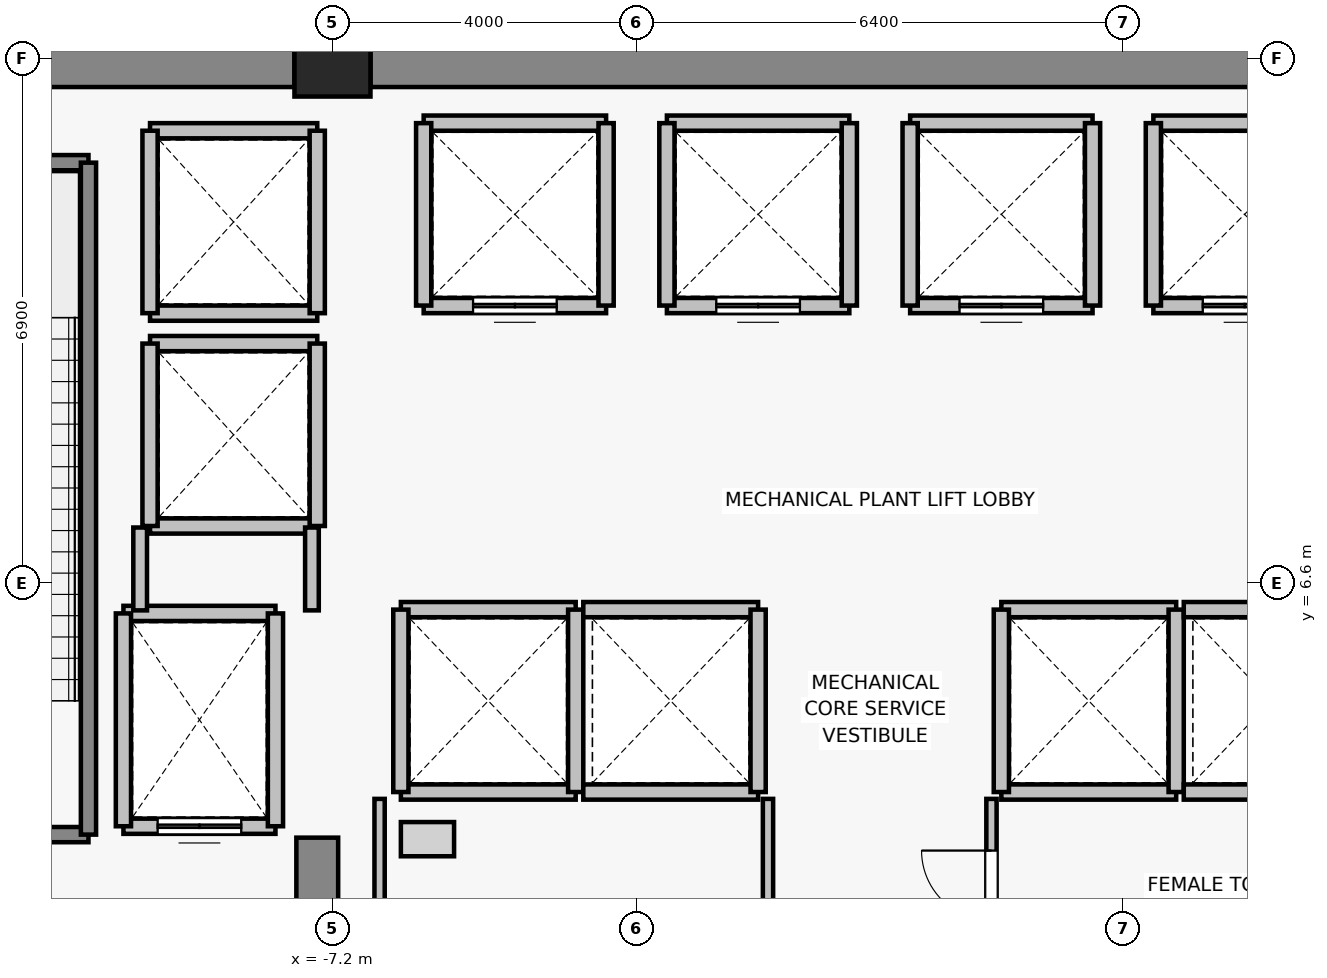
"""IFC4 building model, lengths in metres.
Left out: names, types, materials, properties, quantities, classifications, styles, units other than length and angle.
Written with IfcOpenShell. Run it as: python <this file> out.ifc"""

import sys

from ifc_helpers import new_model, si_unit, direction, frame, frame_2d, origin, origin_2d, place, context, subcontext, project, spatial, rectangle, extrude, source, transform, mapped, element, fill, save


model = new_model("IFC4")
c1 = context("Model", 3, precision=1e-05, world=origin(), true_north=direction((0.0, 1.0)))
c2 = subcontext(c1, "Body", "Model", "MODEL_VIEW")
j1 = project(units=[si_unit("LENGTHUNIT", "METRE"), si_unit("PLANEANGLEUNIT", "RADIAN")], contexts=[c1])
p1 = place(None, origin())
s1 = spatial("IfcSite", under=j1, at=p1, CompositionType="ELEMENT")
p2 = place(p1, origin())
s2 = spatial("IfcBuilding", under=s1, at=p2, CompositionType="ELEMENT")
p3 = place(p2, frame((0.0, 0.0, 80.2)))
s3 = spatial("IfcBuildingStorey", under=s2, at=p3, CompositionType="ELEMENT", Elevation=80.2)
p4 = place(p3, frame((-7.2, 13.5, 0.0), z_axis=(0.0, 0.0, 1.0), x_axis=(1.0, 0.0, 0.0)))
e1 = element("IfcColumn", 1, at=p4, inside=s3, PredefinedType="COLUMN", context=c2, shape_type="SweptSolid", body=[
    extrude(rectangle(XDim=1.0, YDim=1.0, at=origin_2d()), origin(), (0.0, 0.0, 1.0), 6.6),
])
p5 = place(p3, frame((-13.9, 13.5, 0.0), z_axis=(0.0, 0.0, 1.0), x_axis=(1.0, 0.0, 0.0)))
e2 = element("IfcWall", 2, at=p5, inside=s3, PredefinedType="SHEAR", context=c2, shape_type="SweptSolid", body=[
    extrude(rectangle(XDim=6.2, YDim=0.75, at=frame_2d((3.1, 0.0))), origin(), (0.0, 0.0, 1.0), 6.35),
])
p6 = place(p3, frame((-6.7, 13.5, 0.0), z_axis=(0.0, 0.0, 1.0), x_axis=(1.0, 0.0, 0.0)))
e3 = element("IfcWall", 3, at=p6, inside=s3, PredefinedType="SHEAR", context=c2, shape_type="SweptSolid", body=[
    extrude(rectangle(XDim=13.4, YDim=0.75, at=frame_2d((6.7, 0.0))), origin(), (0.0, 0.0, 1.0), 6.35),
])
p7 = place(p3, frame((-7.4, -0.825, 0.0), z_axis=(0.0, 0.0, 1.0), x_axis=(0.0, 1.0, 0.0)))
e4 = element("IfcWall", 4, at=p7, inside=s3, PredefinedType="SHEAR", context=c2, shape_type="SweptSolid", body=[
    extrude(rectangle(XDim=4.075, YDim=0.55, at=frame_2d((2.038, 0.0))), origin(), (0.0, 0.0, 1.0), 6.35),
])
p8 = place(p3, frame((-7.95, 3.4, 0.0), z_axis=(0.0, 0.0, 1.0), x_axis=(-1.0, 0.0, 0.0)))
e5 = element("IfcWall", 5, at=p8, inside=s3, PredefinedType="SOLIDWALL", context=c2, shape_type="SweptSolid", body=[
    extrude(rectangle(XDim=2.0, YDim=0.2, at=frame_2d((1.0, 0.0))), origin(), (0.0, 0.0, 1.0), 6.35),
])
p9 = place(p8, frame((0.45, 0.0, 0.0)))
e6 = element("IfcOpeningElement", 6, at=p9, cuts=e5, PredefinedType="OPENING", context=c2, shape_type="SweptSolid", body=[
    extrude(rectangle(XDim=1.1, YDim=2.2, at=frame_2d((0.55, 1.1))), frame((0.0, 0.11, 0.0), z_axis=(0.0, -1.0, 0.0), x_axis=(1.0, 0.0, 0.0)), (0.0, 0.0, 1.0), 0.22),
])
p10 = place(p3, frame((-9.95, 6.2, 0.0), z_axis=(0.0, 0.0, 1.0), x_axis=(1.0, 0.0, 0.0)))
e7 = element("IfcWall", 7, at=p10, inside=s3, PredefinedType="SOLIDWALL", context=c2, shape_type="SweptSolid", body=[
    extrude(rectangle(XDim=2.0, YDim=0.2, at=frame_2d((1.0, 0.0))), origin(), (0.0, 0.0, 1.0), 6.35),
])
for number, where, z_axis, x_axis in (
    (8, (-9.95, 3.4, 0.0), (0.0, 0.0, 1.0), (0.0, 1.0, 0.0)),
    (9, (-7.95, 6.2, 0.0), (0.0, 0.0, 1.0), (0.0, -1.0, 0.0)),
):
    element("IfcWall", number, at=place(p3, frame(where, z_axis=z_axis, x_axis=x_axis)), inside=s3, PredefinedType="SOLIDWALL", context=c2, shape_type="SweptSolid", body=[
        extrude(rectangle(XDim=2.8, YDim=0.2, at=frame_2d((1.4, 0.0))), origin(), (0.0, 0.0, 1.0), 6.35),
    ])
p11 = place(p3, frame((-3.6, 10.25, 0.0), z_axis=(0.0, 0.0, 1.0), x_axis=(-1.0, 0.0, 0.0)))
e10 = element("IfcWall", 10, at=p11, inside=s3, PredefinedType="SOLIDWALL", context=c2, shape_type="SweptSolid", body=[
    extrude(rectangle(XDim=2.4, YDim=0.2, at=frame_2d((1.2, 0.0))), origin(), (0.0, 0.0, 1.0), 5.89),
])
p12 = place(p11, frame((0.65, 0.0, 0.0)))
e11 = element("IfcOpeningElement", 11, at=p12, cuts=e10, PredefinedType="OPENING", context=c2, shape_type="SweptSolid", body=[
    extrude(rectangle(XDim=1.1, YDim=2.2, at=frame_2d((0.55, 1.1))), frame((0.0, 0.11, 0.0), z_axis=(0.0, -1.0, 0.0), x_axis=(1.0, 0.0, 0.0)), (0.0, 0.0, 1.0), 0.22),
])
p13 = place(p3, frame((-6.0, 12.65, 0.0), z_axis=(0.0, 0.0, 1.0), x_axis=(1.0, 0.0, 0.0)))
e12 = element("IfcWall", 12, at=p13, inside=s3, PredefinedType="SOLIDWALL", context=c2, shape_type="SweptSolid", body=[
    extrude(rectangle(XDim=2.4, YDim=0.2, at=frame_2d((1.2, 0.0))), origin(), (0.0, 0.0, 1.0), 5.89),
])
for number, where, z_axis, x_axis in (
    (13, (-6.0, 10.25, 0.0), (0.0, 0.0, 1.0), (0.0, 1.0, 0.0)),
    (14, (-3.6, 12.65, 0.0), (0.0, 0.0, 1.0), (0.0, -1.0, 0.0)),
):
    element("IfcWall", number, at=place(p3, frame(where, z_axis=z_axis, x_axis=x_axis)), inside=s3, PredefinedType="SOLIDWALL", context=c2, shape_type="SweptSolid", body=[
        extrude(rectangle(XDim=2.4, YDim=0.2, at=frame_2d((1.2, 0.0))), origin(), (0.0, 0.0, 1.0), 6.35),
    ])
p14 = place(p3, frame((-0.4, 10.25, 0.0), z_axis=(0.0, 0.0, 1.0), x_axis=(-1.0, 0.0, 0.0)))
e15 = element("IfcWall", 15, at=p14, inside=s3, PredefinedType="SOLIDWALL", context=c2, shape_type="SweptSolid", body=[
    extrude(rectangle(XDim=2.4, YDim=0.2, at=frame_2d((1.2, 0.0))), origin(), (0.0, 0.0, 1.0), 6.35),
])
p15 = place(p14, frame((0.65, 0.0, 0.0)))
e16 = element("IfcOpeningElement", 16, at=p15, cuts=e15, PredefinedType="OPENING", context=c2, shape_type="SweptSolid", body=[
    extrude(rectangle(XDim=1.1, YDim=2.2, at=frame_2d((0.55, 1.1))), frame((0.0, 0.11, 0.0), z_axis=(0.0, -1.0, 0.0), x_axis=(1.0, 0.0, 0.0)), (0.0, 0.0, 1.0), 0.22),
])
p16 = place(p3, frame((-2.8, 12.65, 0.0), z_axis=(0.0, 0.0, 1.0), x_axis=(1.0, 0.0, 0.0)))
e17 = element("IfcWall", 17, at=p16, inside=s3, PredefinedType="SOLIDWALL", context=c2, shape_type="SweptSolid", body=[
    extrude(rectangle(XDim=2.4, YDim=0.2, at=frame_2d((1.2, 0.0))), origin(), (0.0, 0.0, 1.0), 6.35),
])
for number, where, z_axis, x_axis in (
    (18, (-2.8, 10.25, 0.0), (0.0, 0.0, 1.0), (0.0, 1.0, 0.0)),
    (19, (-0.4, 12.65, 0.0), (0.0, 0.0, 1.0), (0.0, -1.0, 0.0)),
):
    element("IfcWall", number, at=place(p3, frame(where, z_axis=z_axis, x_axis=x_axis)), inside=s3, PredefinedType="SOLIDWALL", context=c2, shape_type="SweptSolid", body=[
        extrude(rectangle(XDim=2.4, YDim=0.2, at=frame_2d((1.2, 0.0))), origin(), (0.0, 0.0, 1.0), 6.35),
    ])
p17 = place(p3, frame((2.8, 10.25, 0.0), z_axis=(0.0, 0.0, 1.0), x_axis=(-1.0, 0.0, 0.0)))
e20 = element("IfcWall", 20, at=p17, inside=s3, PredefinedType="SOLIDWALL", context=c2, shape_type="SweptSolid", body=[
    extrude(rectangle(XDim=2.4, YDim=0.2, at=frame_2d((1.2, 0.0))), origin(), (0.0, 0.0, 1.0), 6.35),
])
p18 = place(p17, frame((0.65, 0.0, 0.0)))
e21 = element("IfcOpeningElement", 21, at=p18, cuts=e20, PredefinedType="OPENING", context=c2, shape_type="SweptSolid", body=[
    extrude(rectangle(XDim=1.1, YDim=2.2, at=frame_2d((0.55, 1.1))), frame((0.0, 0.11, 0.0), z_axis=(0.0, -1.0, 0.0), x_axis=(1.0, 0.0, 0.0)), (0.0, 0.0, 1.0), 0.22),
])
p19 = place(p3, frame((0.4, 12.65, 0.0), z_axis=(0.0, 0.0, 1.0), x_axis=(1.0, 0.0, 0.0)))
e22 = element("IfcWall", 22, at=p19, inside=s3, PredefinedType="SOLIDWALL", context=c2, shape_type="SweptSolid", body=[
    extrude(rectangle(XDim=2.4, YDim=0.2, at=frame_2d((1.2, 0.0))), origin(), (0.0, 0.0, 1.0), 6.35),
])
for number, where, z_axis, x_axis in (
    (23, (0.4, 10.25, 0.0), (0.0, 0.0, 1.0), (0.0, 1.0, 0.0)),
    (24, (2.8, 12.65, 0.0), (0.0, 0.0, 1.0), (0.0, -1.0, 0.0)),
):
    element("IfcWall", number, at=place(p3, frame(where, z_axis=z_axis, x_axis=x_axis)), inside=s3, PredefinedType="SOLIDWALL", context=c2, shape_type="SweptSolid", body=[
        extrude(rectangle(XDim=2.4, YDim=0.2, at=frame_2d((1.2, 0.0))), origin(), (0.0, 0.0, 1.0), 6.35),
    ])
p20 = place(p3, frame((6.0, 10.25, 0.0), z_axis=(0.0, 0.0, 1.0), x_axis=(-1.0, 0.0, 0.0)))
e25 = element("IfcWall", 25, at=p20, inside=s3, PredefinedType="SOLIDWALL", context=c2, shape_type="SweptSolid", body=[
    extrude(rectangle(XDim=2.4, YDim=0.2, at=frame_2d((1.2, 0.0))), origin(), (0.0, 0.0, 1.0), 5.89),
])
p21 = place(p20, frame((0.65, 0.0, 0.0)))
e26 = element("IfcOpeningElement", 26, at=p21, cuts=e25, PredefinedType="OPENING", context=c2, shape_type="SweptSolid", body=[
    extrude(rectangle(XDim=1.1, YDim=2.2, at=frame_2d((0.55, 1.1))), frame((0.0, 0.11, 0.0), z_axis=(0.0, -1.0, 0.0), x_axis=(1.0, 0.0, 0.0)), (0.0, 0.0, 1.0), 0.22),
])
p22 = place(p3, frame((3.6, 12.65, 0.0), z_axis=(0.0, 0.0, 1.0), x_axis=(1.0, 0.0, 0.0)))
e27 = element("IfcWall", 27, at=p22, inside=s3, PredefinedType="SOLIDWALL", context=c2, shape_type="SweptSolid", body=[
    extrude(rectangle(XDim=2.4, YDim=0.2, at=frame_2d((1.2, 0.0))), origin(), (0.0, 0.0, 1.0), 5.89),
])
p23 = place(p3, frame((3.6, 10.25, 0.0), z_axis=(0.0, 0.0, 1.0), x_axis=(0.0, 1.0, 0.0)))
e28 = element("IfcWall", 28, at=p23, inside=s3, PredefinedType="SOLIDWALL", context=c2, shape_type="SweptSolid", body=[
    extrude(rectangle(XDim=2.4, YDim=0.2, at=frame_2d((1.2, 0.0))), origin(), (0.0, 0.0, 1.0), 6.35),
])
for number, where, z_axis, x_axis in (
    (29, (-4.0, 3.85, 0.0), (0.0, 0.0, 1.0), (-1.0, 0.0, 0.0)),
    (30, (-6.3, 6.25, 0.0), (0.0, 0.0, 1.0), (1.0, 0.0, 0.0)),
):
    element("IfcWall", number, at=place(p3, frame(where, z_axis=z_axis, x_axis=x_axis)), inside=s3, PredefinedType="SOLIDWALL", context=c2, shape_type="SweptSolid", body=[
        extrude(rectangle(XDim=2.3, YDim=0.2, at=frame_2d((1.15, 0.0))), origin(), (0.0, 0.0, 1.0), 6.35),
    ])
for number, where, z_axis, x_axis in (
    (31, (-6.3, 3.85, 0.0), (0.0, 0.0, 1.0), (0.0, 1.0, 0.0)),
    (32, (-4.0, 6.25, 0.0), (0.0, 0.0, 1.0), (0.0, -1.0, 0.0)),
):
    element("IfcWall", number, at=place(p3, frame(where, z_axis=z_axis, x_axis=x_axis)), inside=s3, PredefinedType="SOLIDWALL", context=c2, shape_type="SweptSolid", body=[
        extrude(rectangle(XDim=2.4, YDim=0.2, at=frame_2d((1.2, 0.0))), origin(), (0.0, 0.0, 1.0), 6.35),
    ])
for number, where, z_axis, x_axis in (
    (33, (-1.6, 3.85, 0.0), (0.0, 0.0, 1.0), (-1.0, 0.0, 0.0)),
    (34, (-3.9, 6.25, 0.0), (0.0, 0.0, 1.0), (1.0, 0.0, 0.0)),
):
    element("IfcWall", number, at=place(p3, frame(where, z_axis=z_axis, x_axis=x_axis)), inside=s3, PredefinedType="SOLIDWALL", context=c2, shape_type="SweptSolid", body=[
        extrude(rectangle(XDim=2.3, YDim=0.2, at=frame_2d((1.15, 0.0))), origin(), (0.0, 0.0, 1.0), 6.35),
    ])
p24 = place(p3, frame((-1.6, 6.25, 0.0), z_axis=(0.0, 0.0, 1.0), x_axis=(0.0, -1.0, 0.0)))
e35 = element("IfcWall", 35, at=p24, inside=s3, PredefinedType="SOLIDWALL", context=c2, shape_type="SweptSolid", body=[
    extrude(rectangle(XDim=2.4, YDim=0.2, at=frame_2d((1.2, 0.0))), origin(), (0.0, 0.0, 1.0), 6.35),
])
for number, where, z_axis, x_axis in (
    (36, (3.9, 3.85, 0.0), (0.0, 0.0, 1.0), (-1.0, 0.0, 0.0)),
    (37, (1.6, 6.25, 0.0), (0.0, 0.0, 1.0), (1.0, 0.0, 0.0)),
):
    element("IfcWall", number, at=place(p3, frame(where, z_axis=z_axis, x_axis=x_axis)), inside=s3, PredefinedType="SOLIDWALL", context=c2, shape_type="SweptSolid", body=[
        extrude(rectangle(XDim=2.3, YDim=0.2, at=frame_2d((1.15, 0.0))), origin(), (0.0, 0.0, 1.0), 6.35),
    ])
for number, where, z_axis, x_axis in (
    (38, (1.6, 3.85, 0.0), (0.0, 0.0, 1.0), (0.0, 1.0, 0.0)),
    (39, (3.9, 6.25, 0.0), (0.0, 0.0, 1.0), (0.0, -1.0, 0.0)),
):
    element("IfcWall", number, at=place(p3, frame(where, z_axis=z_axis, x_axis=x_axis)), inside=s3, PredefinedType="SOLIDWALL", context=c2, shape_type="SweptSolid", body=[
        extrude(rectangle(XDim=2.4, YDim=0.2, at=frame_2d((1.2, 0.0))), origin(), (0.0, 0.0, 1.0), 6.35),
    ])
for number, where, z_axis, x_axis in (
    (40, (6.3, 3.85, 0.0), (0.0, 0.0, 1.0), (-1.0, 0.0, 0.0)),
    (41, (4.0, 6.25, 0.0), (0.0, 0.0, 1.0), (1.0, 0.0, 0.0)),
):
    element("IfcWall", number, at=place(p3, frame(where, z_axis=z_axis, x_axis=x_axis)), inside=s3, PredefinedType="SOLIDWALL", context=c2, shape_type="SweptSolid", body=[
        extrude(rectangle(XDim=2.3, YDim=0.2, at=frame_2d((1.15, 0.0))), origin(), (0.0, 0.0, 1.0), 6.35),
    ])
for number, where, z_axis, x_axis in (
    (42, (-7.4, 7.35, 0.0), (0.0, 0.0, 1.0), (-1.0, 0.0, 0.0)),
    (43, (-9.6, 9.75, 0.0), (0.0, 0.0, 1.0), (1.0, 0.0, 0.0)),
):
    element("IfcWall", number, at=place(p3, frame(where, z_axis=z_axis, x_axis=x_axis)), inside=s3, PredefinedType="SOLIDWALL", context=c2, shape_type="SweptSolid", body=[
        extrude(rectangle(XDim=2.2, YDim=0.2, at=frame_2d((1.1, 0.0))), origin(), (0.0, 0.0, 1.0), 5.79),
    ])
p25 = place(p3, frame((-9.6, 7.35, 0.0), z_axis=(0.0, 0.0, 1.0), x_axis=(0.0, 1.0, 0.0)))
e44 = element("IfcWall", 44, at=p25, inside=s3, PredefinedType="SOLIDWALL", context=c2, shape_type="SweptSolid", body=[
    extrude(rectangle(XDim=2.4, YDim=0.2, at=frame_2d((1.2, 0.0))), origin(), (0.0, 0.0, 1.0), 6.35),
])
p26 = place(p3, frame((-7.4, 9.75, 0.0), z_axis=(0.0, 0.0, 1.0), x_axis=(0.0, -1.0, 0.0)))
e45 = element("IfcWall", 45, at=p26, inside=s3, PredefinedType="SOLIDWALL", context=c2, shape_type="SweptSolid", body=[
    extrude(rectangle(XDim=2.4, YDim=0.2, at=frame_2d((1.2, 0.0))), origin(), (0.0, 0.0, 1.0), 5.79),
])
for number, where, z_axis, x_axis in (
    (46, (-7.4, 10.15, 0.0), (0.0, 0.0, 1.0), (-1.0, 0.0, 0.0)),
    (47, (-9.6, 12.55, 0.0), (0.0, 0.0, 1.0), (1.0, 0.0, 0.0)),
):
    element("IfcWall", number, at=place(p3, frame(where, z_axis=z_axis, x_axis=x_axis)), inside=s3, PredefinedType="SOLIDWALL", context=c2, shape_type="SweptSolid", body=[
        extrude(rectangle(XDim=2.2, YDim=0.2, at=frame_2d((1.1, 0.0))), origin(), (0.0, 0.0, 1.0), 5.79),
    ])
p27 = place(p3, frame((-9.6, 10.15, 0.0), z_axis=(0.0, 0.0, 1.0), x_axis=(0.0, 1.0, 0.0)))
e48 = element("IfcWall", 48, at=p27, inside=s3, PredefinedType="SOLIDWALL", context=c2, shape_type="SweptSolid", body=[
    extrude(rectangle(XDim=2.4, YDim=0.2, at=frame_2d((1.2, 0.0))), origin(), (0.0, 0.0, 1.0), 6.35),
])
p28 = place(p3, frame((-7.4, 12.55, 0.0), z_axis=(0.0, 0.0, 1.0), x_axis=(0.0, -1.0, 0.0)))
e49 = element("IfcWall", 49, at=p28, inside=s3, PredefinedType="SOLIDWALL", context=c2, shape_type="SweptSolid", body=[
    extrude(rectangle(XDim=2.4, YDim=0.2, at=frame_2d((1.2, 0.0))), origin(), (0.0, 0.0, 1.0), 5.79),
])
p29 = place(p3, frame((-10.41, 3.29, 0.0), z_axis=(0.0, 0.0, 1.0), x_axis=(-1.0, 0.0, 0.0)))
e50 = element("IfcWall", 50, at=p29, inside=s3, PredefinedType="SOLIDWALL", context=c2, shape_type="SweptSolid", body=[
    extrude(rectangle(XDim=3.52, YDim=0.2, at=frame_2d((1.76, 0.0))), origin(), (0.0, 0.0, 1.0), 6.35),
])
p30 = place(p29, frame((1.165, 0.0, 0.0)))
e51 = element("IfcOpeningElement", 51, at=p30, cuts=e50, PredefinedType="OPENING", context=c2, shape_type="SweptSolid", body=[
    extrude(rectangle(XDim=1.15, YDim=2.15, at=frame_2d((0.575, 1.075))), frame((0.0, 0.11, 0.0), z_axis=(0.0, -1.0, 0.0), x_axis=(1.0, 0.0, 0.0)), (0.0, 0.0, 1.0), 0.22),
])
p31 = place(p3, frame((-13.93, 12.13, 0.0), z_axis=(0.0, 0.0, 1.0), x_axis=(1.0, 0.0, 0.0)))
e52 = element("IfcWall", 52, at=p31, inside=s3, PredefinedType="SOLIDWALL", context=c2, shape_type="SweptSolid", body=[
    extrude(rectangle(XDim=3.52, YDim=0.2, at=frame_2d((1.76, 0.0))), origin(), (0.0, 0.0, 1.0), 6.35),
])
p32 = place(p3, frame((-10.41, 12.13, 0.0), z_axis=(0.0, 0.0, 1.0), x_axis=(0.0, -1.0, 0.0)))
e53 = element("IfcWall", 53, at=p32, inside=s3, PredefinedType="SOLIDWALL", context=c2, shape_type="SweptSolid", body=[
    extrude(rectangle(XDim=8.84, YDim=0.2, at=frame_2d((4.42, 0.0))), origin(), (0.0, 0.0, 1.0), 6.35),
])
p33 = place(p3, frame((-9.73, 6.24, 0.0), z_axis=(0.0, 0.0, 1.0), x_axis=(0.0, 1.0, 0.0)))
e54 = element("IfcWall", 54, at=p33, inside=s3, PredefinedType="PARTITIONING", context=c2, shape_type="SweptSolid", body=[
    extrude(rectangle(XDim=1.09, YDim=0.18, at=frame_2d((0.545, 0.0))), origin(), (0.0, 0.0, 1.0), 6.35),
])
p34 = place(p3, frame((-7.47, 7.33, 0.0), z_axis=(0.0, 0.0, 1.0), x_axis=(0.0, -1.0, 0.0)))
e55 = element("IfcWall", 55, at=p34, inside=s3, PredefinedType="PARTITIONING", context=c2, shape_type="SweptSolid", body=[
    extrude(rectangle(XDim=1.09, YDim=0.18, at=frame_2d((0.545, 0.0))), origin(), (0.0, 0.0, 1.0), 5.79),
])
p35 = place(p3, frame((-6.58, -0.73, 0.0), z_axis=(0.0, 0.0, 1.0), x_axis=(0.0, 1.0, 0.0)))
e56 = element("IfcWall", 56, at=p35, inside=s3, PredefinedType="PARTITIONING", context=c2, shape_type="SweptSolid", body=[
    extrude(rectangle(XDim=4.49, YDim=0.135, at=frame_2d((2.245, 0.0))), origin(), (0.0, 0.0, 1.0), 6.35),
])
p36 = place(p3, frame((-1.47, 3.76, 0.0), z_axis=(0.0, 0.0, 1.0), x_axis=(0.0, -1.0, 0.0)))
e57 = element("IfcWall", 57, at=p36, inside=s3, PredefinedType="PARTITIONING", context=c2, shape_type="SweptSolid", body=[
    extrude(rectangle(XDim=4.49, YDim=0.135, at=frame_2d((2.245, 0.0))), origin(), (0.0, 0.0, 1.0), 6.35),
])
p37 = place(p36, frame((1.8, 0.0, 0.0)))
e58 = element("IfcOpeningElement", 58, at=p37, cuts=e57, PredefinedType="OPENING", context=c2, shape_type="SweptSolid", body=[
    extrude(rectangle(XDim=0.92, YDim=2.1, at=frame_2d((0.46, 1.05))), frame((0.0, 0.077, 0.0), z_axis=(0.0, -1.0, 0.0), x_axis=(1.0, 0.0, 0.0)), (0.0, 0.0, 1.0), 0.155),
])
p38 = place(p3, frame((1.47, 1.48, 0.0), z_axis=(0.0, 0.0, 1.0), x_axis=(0.0, 1.0, 0.0)))
e59 = element("IfcWall", 59, at=p38, inside=s3, PredefinedType="PARTITIONING", context=c2, shape_type="SweptSolid", body=[
    extrude(rectangle(XDim=2.28, YDim=0.135, at=frame_2d((1.14, 0.0))), origin(), (0.0, 0.0, 1.0), 6.35),
])
p39 = place(p38, frame((0.68, 0.0, 0.0)))
e60 = element("IfcOpeningElement", 60, at=p39, cuts=e59, PredefinedType="OPENING", context=c2, shape_type="SweptSolid", body=[
    extrude(rectangle(XDim=0.92, YDim=2.1, at=frame_2d((0.46, 1.05))), frame((0.0, 0.077, 0.0), z_axis=(0.0, -1.0, 0.0), x_axis=(1.0, 0.0, 0.0)), (0.0, 0.0, 1.0), 0.155),
])
m1 = source(origin(), c2, "Body", "SweptSolid", [
    extrude(rectangle(XDim=1.1, YDim=2.2, at=frame_2d((0.55, 1.1))), frame((0.0, 0.025, 0.0), z_axis=(0.0, -1.0, 0.0), x_axis=(1.0, 0.0, 0.0)), (0.0, 0.0, 1.0), 0.05),
])
p40 = place(p9, origin())
e61 = element("IfcDoor", 61, at=p40, inside=s3, OperationType="DOUBLE_DOOR_SLIDING", PredefinedType="DOOR", context=c2, shape_type="MappedRepresentation", body=[
    mapped(m1, transform((0.0, 0.0, 0.0), x_axis=(1.0, 0.0, 0.0), y_axis=(0.0, 1.0, 0.0), z_axis=(0.0, 0.0, 1.0), scale=1.0)),
])
fill(e6, e61)
p41 = place(p12, origin())
e62 = element("IfcDoor", 62, at=p41, inside=s3, OperationType="DOUBLE_DOOR_SLIDING", PredefinedType="DOOR", context=c2, shape_type="MappedRepresentation", body=[
    mapped(m1, transform((0.0, 0.0, 0.0), x_axis=(1.0, 0.0, 0.0), y_axis=(0.0, 1.0, 0.0), z_axis=(0.0, 0.0, 1.0), scale=1.0)),
])
fill(e11, e62)
p42 = place(p15, origin())
e63 = element("IfcDoor", 63, at=p42, inside=s3, OperationType="DOUBLE_DOOR_SLIDING", PredefinedType="DOOR", context=c2, shape_type="MappedRepresentation", body=[
    mapped(m1, transform((0.0, 0.0, 0.0), x_axis=(1.0, 0.0, 0.0), y_axis=(0.0, 1.0, 0.0), z_axis=(0.0, 0.0, 1.0), scale=1.0)),
])
fill(e16, e63)
p43 = place(p18, origin())
e64 = element("IfcDoor", 64, at=p43, inside=s3, OperationType="DOUBLE_DOOR_SLIDING", PredefinedType="DOOR", context=c2, shape_type="MappedRepresentation", body=[
    mapped(m1, transform((0.0, 0.0, 0.0), x_axis=(1.0, 0.0, 0.0), y_axis=(0.0, 1.0, 0.0), z_axis=(0.0, 0.0, 1.0), scale=1.0)),
])
fill(e21, e64)
p44 = place(p21, origin())
e65 = element("IfcDoor", 65, at=p44, inside=s3, OperationType="DOUBLE_DOOR_SLIDING", PredefinedType="DOOR", context=c2, shape_type="MappedRepresentation", body=[
    mapped(m1, transform((0.0, 0.0, 0.0), x_axis=(1.0, 0.0, 0.0), y_axis=(0.0, 1.0, 0.0), z_axis=(0.0, 0.0, 1.0), scale=1.0)),
])
fill(e26, e65)
m2 = source(origin(), c2, "Body", "SweptSolid", [
    extrude(rectangle(XDim=0.92, YDim=2.1, at=frame_2d((0.46, 1.05))), frame((0.0, 0.025, 0.0), z_axis=(0.0, -1.0, 0.0), x_axis=(1.0, 0.0, 0.0)), (0.0, 0.0, 1.0), 0.05),
])
p45 = place(p39, origin())
e66 = element("IfcDoor", 66, at=p45, inside=s3, OperationType="SINGLE_SWING_RIGHT", PredefinedType="DOOR", context=c2, shape_type="MappedRepresentation", body=[
    mapped(m2, transform((0.0, 0.0, 0.0), x_axis=(1.0, 0.0, 0.0), y_axis=(0.0, 1.0, 0.0), z_axis=(0.0, 0.0, 1.0), scale=1.0)),
])
fill(e60, e66)
save(model, sys.argv[1])
